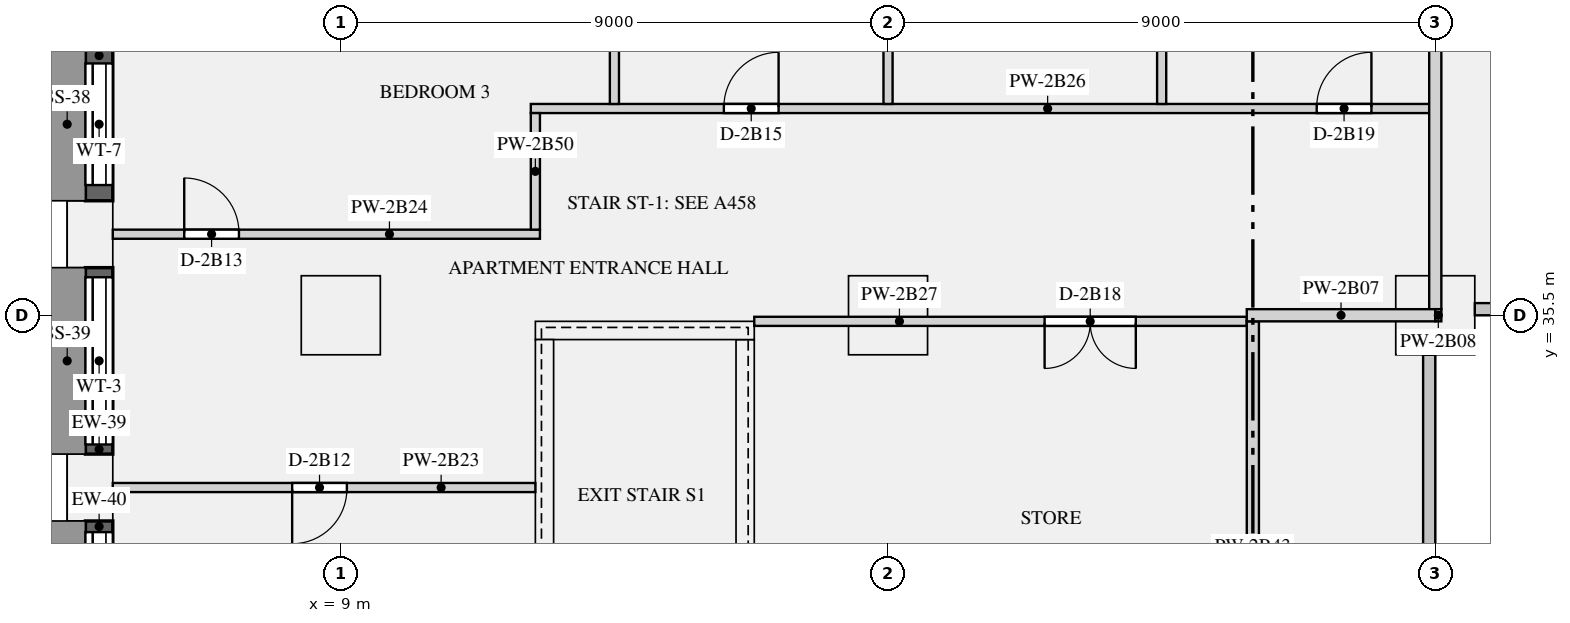
"""IFC4 building model, lengths in metres.
Left out: names, types, materials, properties, quantities, classifications, styles, units other than length and angle.
Written with IfcOpenShell. Run it as: python <this file> out.ifc"""

import sys

from ifc_helpers import new_model, si_unit, direction, frame, frame_2d, origin, origin_2d, place, context, subcontext, project, spatial, rectangle, extrude, element, fill, save


model = new_model("IFC4")
c1 = context("Model", 3, precision=1e-05, world=origin(), true_north=direction((0.0, 1.0)))
c2 = subcontext(c1, "Body", "Model", "MODEL_VIEW")
j1 = project(units=[si_unit("LENGTHUNIT", "METRE"), si_unit("PLANEANGLEUNIT", "RADIAN")], contexts=[c1])
p1 = place(None, origin())
s1 = spatial("IfcSite", under=j1, at=p1, CompositionType="ELEMENT")
p2 = place(p1, origin())
s2 = spatial("IfcBuilding", under=s1, at=p2, CompositionType="ELEMENT")
p3 = place(p2, frame((0.0, 0.0, 93.0)))
s3 = spatial("IfcBuildingStorey", under=s2, at=p3, CompositionType="ELEMENT", Elevation=93.0)
for number, where, z_axis, x_axis in (
    (1, (4.875, 36.833, 0.0), (0.0, 0.0, 1.0), (0.0, -1.0, 0.0)),
    (2, (4.875, 32.667, 0.0), (0.0, 0.0, 1.0), (0.0, -1.0, 0.0)),
):
    element("IfcColumn", number, at=place(p3, frame(where, z_axis=z_axis, x_axis=x_axis)), inside=s3, PredefinedType="USERDEFINED", context=c2, shape_type="SweptSolid", body=[
        extrude(rectangle(XDim=1.1, YDim=0.75, at=origin_2d()), origin(), (0.0, 0.0, 1.0), 3.15),
    ])
for number, where, z_axis, x_axis in (
    (3, (9.0, 35.5, 0.0), (0.0, 0.0, 1.0), (1.0, 0.0, 0.0)),
    (4, (18.0, 35.5, 0.0), (0.0, 0.0, 1.0), (1.0, 0.0, 0.0)),
    (5, (27.0, 35.5, 0.0), (0.0, 0.0, 1.0), (1.0, 0.0, 0.0)),
):
    element("IfcColumn", number, at=place(p3, frame(where, z_axis=z_axis, x_axis=x_axis)), inside=s3, PredefinedType="COLUMN", context=c2, shape_type="SweptSolid", body=[
        extrude(rectangle(XDim=1.3, YDim=1.3, at=origin_2d()), origin(), (0.0, 0.0, 1.0), 3.15),
    ])
p4 = place(p3, frame((12.2, 35.25, 0.0), z_axis=(0.0, 0.0, 1.0), x_axis=(1.0, 0.0, 0.0)))
e6 = element("IfcWall", 6, at=p4, inside=s3, PredefinedType="SHEAR", context=c2, shape_type="SweptSolid", body=[
    extrude(rectangle(XDim=3.6, YDim=0.3, at=frame_2d((1.8, 0.0))), origin(), (0.0, 0.0, 1.0), 3.15),
])
for number, where, z_axis, x_axis in (
    (7, (12.35, 27.3, 0.0), (0.0, 0.0, 1.0), (0.0, 1.0, 0.0)),
    (8, (15.65, 27.3, 0.0), (0.0, 0.0, 1.0), (0.0, 1.0, 0.0)),
):
    element("IfcWall", number, at=place(p3, frame(where, z_axis=z_axis, x_axis=x_axis)), inside=s3, PredefinedType="SHEAR", context=c2, shape_type="SweptSolid", body=[
        extrude(rectangle(XDim=7.8, YDim=0.3, at=frame_2d((3.9, 0.0))), origin(), (0.0, 0.0, 1.0), 3.15),
    ])
p5 = place(p3, frame((5.025, 39.9, 0.9), z_axis=(0.0, 0.0, 1.0), x_axis=(0.0, -1.0, 0.0)))
e9 = element("IfcWall", 9, at=p5, inside=s3, PredefinedType="SOLIDWALL", context=c2, shape_type="SweptSolid", body=[
    extrude(rectangle(XDim=2.517, YDim=0.45, at=frame_2d((1.258, 0.0))), origin(), (0.0, 0.0, 1.0), 1.93),
])
p6 = place(p5, frame((0.259, 0.0, 0.15)))
e10 = element("IfcOpeningElement", 10, at=p6, cuts=e9, PredefinedType="OPENING", context=c2, shape_type="SweptSolid", body=[
    extrude(rectangle(XDim=2.0, YDim=1.5, at=frame_2d((1.0, 0.75))), frame((0.0, 0.235, 0.0), z_axis=(0.0, -1.0, 0.0), x_axis=(1.0, 0.0, 0.0)), (0.0, 0.0, 1.0), 0.47),
])
p7 = place(p3, frame((5.025, 36.283, 0.9), z_axis=(0.0, 0.0, 1.0), x_axis=(0.0, -1.0, 0.0)))
e11 = element("IfcWall", 11, at=p7, inside=s3, PredefinedType="SOLIDWALL", context=c2, shape_type="SweptSolid", body=[
    extrude(rectangle(XDim=3.066, YDim=0.45, at=frame_2d((1.533, 0.0))), origin(), (0.0, 0.0, 1.0), 1.93),
])
p8 = place(p7, frame((0.158, 0.0, 0.15)))
e12 = element("IfcOpeningElement", 12, at=p8, cuts=e11, PredefinedType="OPENING", context=c2, shape_type="SweptSolid", body=[
    extrude(rectangle(XDim=2.75, YDim=1.5, at=frame_2d((1.375, 0.75))), frame((0.0, 0.235, 0.0), z_axis=(0.0, -1.0, 0.0), x_axis=(1.0, 0.0, 0.0)), (0.0, 0.0, 1.0), 0.47),
])
p9 = place(p3, frame((5.025, 32.117, 0.9), z_axis=(0.0, 0.0, 1.0), x_axis=(0.0, -1.0, 0.0)))
e13 = element("IfcWall", 13, at=p9, inside=s3, PredefinedType="SOLIDWALL", context=c2, shape_type="SweptSolid", body=[
    extrude(rectangle(XDim=2.867, YDim=0.45, at=frame_2d((1.434, 0.0))), origin(), (0.0, 0.0, 1.0), 1.93),
])
p10 = place(p9, frame((0.184, 0.0, 0.15)))
e14 = element("IfcOpeningElement", 14, at=p10, cuts=e13, PredefinedType="OPENING", context=c2, shape_type="SweptSolid", body=[
    extrude(rectangle(XDim=2.5, YDim=1.5, at=frame_2d((1.25, 0.75))), frame((0.0, 0.235, 0.0), z_axis=(0.0, -1.0, 0.0), x_axis=(1.0, 0.0, 0.0)), (0.0, 0.0, 1.0), 0.47),
])
p11 = place(p3, frame((23.9, 35.5, 0.0), z_axis=(0.0, 0.0, 1.0), x_axis=(1.0, 0.0, 0.0)))
e15 = element("IfcWall", 15, at=p11, inside=s3, PredefinedType="PARTITIONING", context=c2, shape_type="SweptSolid", body=[
    extrude(rectangle(XDim=3.1, YDim=0.2, at=frame_2d((1.55, 0.0))), origin(), (0.0, 0.0, 1.0), 2.83),
])
p12 = place(p3, frame((27.0, 35.5, 0.0), z_axis=(0.0, 0.0, 1.0), x_axis=(1.0, 0.0, 0.0)))
e16 = element("IfcWall", 16, at=p12, inside=s3, PredefinedType="PARTITIONING", context=c2, shape_type="SweptSolid", body=[
    extrude(rectangle(XDim=0.1, YDim=0.2, at=frame_2d((0.05, 0.0))), origin(), (0.0, 0.0, 1.0), 2.83),
])
p13 = place(p3, frame((5.25, 32.667, 0.0), z_axis=(0.0, 0.0, 1.0), x_axis=(1.0, 0.0, 0.0)))
e17 = element("IfcWall", 17, at=p13, inside=s3, PredefinedType="PARTITIONING", context=c2, shape_type="SweptSolid", body=[
    extrude(rectangle(XDim=6.95, YDim=0.15, at=frame_2d((3.475, 0.0))), origin(), (0.0, 0.0, 1.0), 2.83),
])
p14 = place(p13, frame((2.95, 0.0, 0.0)))
e18 = element("IfcOpeningElement", 18, at=p14, cuts=e17, PredefinedType="OPENING", context=c2, shape_type="SweptSolid", body=[
    extrude(rectangle(XDim=0.9, YDim=2.1, at=frame_2d((0.45, 1.05))), frame((0.0, 0.085, 0.0), z_axis=(0.0, -1.0, 0.0), x_axis=(1.0, 0.0, 0.0)), (0.0, 0.0, 1.0), 0.17),
])
p15 = place(p3, frame((5.25, 36.833, 0.0), z_axis=(0.0, 0.0, 1.0), x_axis=(1.0, 0.0, 0.0)))
e19 = element("IfcWall", 19, at=p15, inside=s3, PredefinedType="PARTITIONING", context=c2, shape_type="SweptSolid", body=[
    extrude(rectangle(XDim=7.025, YDim=0.15, at=frame_2d((3.512, 0.0))), origin(), (0.0, 0.0, 1.0), 2.83),
])
p16 = place(p15, frame((1.175, 0.0, 0.0)))
e20 = element("IfcOpeningElement", 20, at=p16, cuts=e19, PredefinedType="OPENING", context=c2, shape_type="SweptSolid", body=[
    extrude(rectangle(XDim=0.9, YDim=2.1, at=frame_2d((0.45, 1.05))), frame((0.0, 0.085, 0.0), z_axis=(0.0, -1.0, 0.0), x_axis=(1.0, 0.0, 0.0)), (0.0, 0.0, 1.0), 0.17),
])
p17 = place(p3, frame((12.125, 38.9, 0.0), z_axis=(0.0, 0.0, 1.0), x_axis=(1.0, 0.0, 0.0)))
e21 = element("IfcWall", 21, at=p17, inside=s3, PredefinedType="PARTITIONING", context=c2, shape_type="SweptSolid", body=[
    extrude(rectangle(XDim=14.775, YDim=0.15, at=frame_2d((7.387, 0.0))), origin(), (0.0, 0.0, 1.0), 2.83),
])
p18 = place(p17, frame((3.175, 0.0, 0.0)))
e22 = element("IfcOpeningElement", 22, at=p18, cuts=e21, PredefinedType="OPENING", context=c2, shape_type="SweptSolid", body=[
    extrude(rectangle(XDim=0.9, YDim=2.1, at=frame_2d((0.45, 1.05))), frame((0.0, 0.085, 0.0), z_axis=(0.0, -1.0, 0.0), x_axis=(1.0, 0.0, 0.0)), (0.0, 0.0, 1.0), 0.17),
])
p19 = place(p17, frame((12.925, 0.0, 0.0)))
e23 = element("IfcOpeningElement", 23, at=p19, cuts=e21, PredefinedType="OPENING", context=c2, shape_type="SweptSolid", body=[
    extrude(rectangle(XDim=0.9, YDim=2.1, at=frame_2d((0.45, 1.05))), frame((0.0, 0.085, 0.0), z_axis=(0.0, -1.0, 0.0), x_axis=(1.0, 0.0, 0.0)), (0.0, 0.0, 1.0), 0.17),
])
p20 = place(p3, frame((15.8, 35.4, 0.0), z_axis=(0.0, 0.0, 1.0), x_axis=(1.0, 0.0, 0.0)))
e24 = element("IfcWall", 24, at=p20, inside=s3, PredefinedType="PARTITIONING", context=c2, shape_type="SweptSolid", body=[
    extrude(rectangle(XDim=8.1, YDim=0.15, at=frame_2d((4.05, 0.0))), origin(), (0.0, 0.0, 1.0), 2.83),
])
p21 = place(p20, frame((4.775, 0.0, 0.0)))
e25 = element("IfcOpeningElement", 25, at=p21, cuts=e24, PredefinedType="OPENING", context=c2, shape_type="SweptSolid", body=[
    extrude(rectangle(XDim=1.5, YDim=2.1, at=frame_2d((0.75, 1.05))), frame((0.0, 0.085, 0.0), z_axis=(0.0, -1.0, 0.0), x_axis=(1.0, 0.0, 0.0)), (0.0, 0.0, 1.0), 0.17),
])
p22 = place(p3, frame((18.0, 38.975, 0.0), z_axis=(0.0, 0.0, 1.0), x_axis=(0.0, 1.0, 0.0)))
e26 = element("IfcWall", 26, at=p22, inside=s3, PredefinedType="PARTITIONING", context=c2, shape_type="SweptSolid", body=[
    extrude(rectangle(XDim=5.775, YDim=0.15, at=frame_2d((2.887, 0.0))), origin(), (0.0, 0.0, 1.0), 2.83),
])
p23 = place(p22, frame((0.975, 0.0, 0.0)))
e27 = element("IfcOpeningElement", 27, at=p23, cuts=e26, PredefinedType="OPENING", context=c2, shape_type="SweptSolid", body=[
    extrude(rectangle(XDim=0.9, YDim=2.1, at=frame_2d((0.45, 1.05))), frame((0.0, 0.085, 0.0), z_axis=(0.0, -1.0, 0.0), x_axis=(1.0, 0.0, 0.0)), (0.0, 0.0, 1.0), 0.17),
])
p24 = place(p22, frame((3.975, 0.0, 0.0)))
e28 = element("IfcOpeningElement", 28, at=p24, cuts=e26, PredefinedType="OPENING", context=c2, shape_type="SweptSolid", body=[
    extrude(rectangle(XDim=0.9, YDim=2.1, at=frame_2d((0.45, 1.05))), frame((0.0, 0.085, 0.0), z_axis=(0.0, -1.0, 0.0), x_axis=(1.0, 0.0, 0.0)), (0.0, 0.0, 1.0), 0.17),
])
p25 = place(p3, frame((24.0, 27.1, 0.0), z_axis=(0.0, 0.0, 1.0), x_axis=(0.0, 1.0, 0.0)))
e29 = element("IfcWall", 29, at=p25, inside=s3, PredefinedType="PARTITIONING", context=c2, shape_type="SweptSolid", body=[
    extrude(rectangle(XDim=8.3, YDim=0.2, at=frame_2d((4.15, 0.0))), origin(), (0.0, 0.0, 1.0), 2.83),
])
p26 = place(p3, frame((13.5, 38.975, 0.0), z_axis=(0.0, 0.0, 1.0), x_axis=(0.0, 1.0, 0.0)))
e30 = element("IfcWall", 30, at=p26, inside=s3, PredefinedType="PARTITIONING", context=c2, shape_type="SweptSolid", body=[
    extrude(rectangle(XDim=5.775, YDim=0.15, at=frame_2d((2.887, 0.0))), origin(), (0.0, 0.0, 1.0), 2.83),
])
p27 = place(p3, frame((12.2, 36.908, 0.0), z_axis=(0.0, 0.0, 1.0), x_axis=(0.0, 1.0, 0.0)))
e31 = element("IfcWall", 31, at=p27, inside=s3, PredefinedType="PARTITIONING", context=c2, shape_type="SweptSolid", body=[
    extrude(rectangle(XDim=1.917, YDim=0.15, at=frame_2d((0.958, 0.0))), origin(), (0.0, 0.0, 1.0), 2.83),
])
p28 = place(p3, frame((27.0, 35.6, 0.0), z_axis=(0.0, 0.0, 1.0), x_axis=(0.0, 1.0, 0.0)))
e32 = element("IfcWall", 32, at=p28, inside=s3, PredefinedType="PARTITIONING", context=c2, shape_type="SweptSolid", body=[
    extrude(rectangle(XDim=9.15, YDim=0.2, at=frame_2d((4.575, 0.0))), origin(), (0.0, 0.0, 1.0), 2.83),
])
p29 = place(p3, frame((22.5, 38.975, 0.0), z_axis=(0.0, 0.0, 1.0), x_axis=(0.0, 1.0, 0.0)))
e33 = element("IfcWall", 33, at=p29, inside=s3, PredefinedType="PARTITIONING", context=c2, shape_type="SweptSolid", body=[
    extrude(rectangle(XDim=5.775, YDim=0.15, at=frame_2d((2.887, 0.0))), origin(), (0.0, 0.0, 1.0), 2.83),
])
p30 = place(p6, origin())
e34 = element("IfcWindow", 34, at=p30, inside=s3, PartitioningType="SINGLE_PANEL", PredefinedType="WINDOW", context=c2, shape_type="SweptSolid", body=[
    extrude(rectangle(XDim=2.0, YDim=1.5, at=frame_2d((1.0, 0.75))), frame((0.0, -0.065, 0.0), z_axis=(0.0, -1.0, 0.0), x_axis=(1.0, 0.0, 0.0)), (0.0, 0.0, 1.0), 0.06),
])
fill(e10, e34)
p31 = place(p8, origin())
e35 = element("IfcWindow", 35, at=p31, inside=s3, PartitioningType="SINGLE_PANEL", PredefinedType="WINDOW", context=c2, shape_type="SweptSolid", body=[
    extrude(rectangle(XDim=2.75, YDim=1.5, at=frame_2d((1.375, 0.75))), frame((0.0, -0.065, 0.0), z_axis=(0.0, -1.0, 0.0), x_axis=(1.0, 0.0, 0.0)), (0.0, 0.0, 1.0), 0.06),
])
fill(e12, e35)
p32 = place(p10, origin())
e36 = element("IfcWindow", 36, at=p32, inside=s3, PartitioningType="SINGLE_PANEL", PredefinedType="WINDOW", context=c2, shape_type="SweptSolid", body=[
    extrude(rectangle(XDim=2.5, YDim=1.5, at=frame_2d((1.25, 0.75))), frame((0.0, -0.065, 0.0), z_axis=(0.0, -1.0, 0.0), x_axis=(1.0, 0.0, 0.0)), (0.0, 0.0, 1.0), 0.06),
])
fill(e14, e36)
p33 = place(p14, frame((0.9, 0.0, 0.0), z_axis=(0.0, 0.0, 1.0), x_axis=(-1.0, 0.0, 0.0)))
e37 = element("IfcDoor", 37, at=p33, inside=s3, OperationType="SINGLE_SWING_RIGHT", PredefinedType="DOOR", context=c2, shape_type="SweptSolid", body=[
    extrude(rectangle(XDim=0.9, YDim=2.1, at=frame_2d((0.45, 1.05))), frame((0.0, 0.025, 0.0), z_axis=(0.0, -1.0, 0.0), x_axis=(1.0, 0.0, 0.0)), (0.0, 0.0, 1.0), 0.05),
])
fill(e18, e37)
p34 = place(p16, origin())
e38 = element("IfcDoor", 38, at=p34, inside=s3, OperationType="SINGLE_SWING_LEFT", PredefinedType="DOOR", context=c2, shape_type="SweptSolid", body=[
    extrude(rectangle(XDim=0.9, YDim=2.1, at=frame_2d((0.45, 1.05))), frame((0.0, 0.025, 0.0), z_axis=(0.0, -1.0, 0.0), x_axis=(1.0, 0.0, 0.0)), (0.0, 0.0, 1.0), 0.05),
])
fill(e20, e38)
p35 = place(p18, origin())
e39 = element("IfcDoor", 39, at=p35, inside=s3, OperationType="SINGLE_SWING_RIGHT", PredefinedType="DOOR", context=c2, shape_type="SweptSolid", body=[
    extrude(rectangle(XDim=0.9, YDim=2.1, at=frame_2d((0.45, 1.05))), frame((0.0, 0.025, 0.0), z_axis=(0.0, -1.0, 0.0), x_axis=(1.0, 0.0, 0.0)), (0.0, 0.0, 1.0), 0.05),
])
fill(e22, e39)
p36 = place(p21, frame((1.5, 0.0, 0.0), z_axis=(0.0, 0.0, 1.0), x_axis=(-1.0, 0.0, 0.0)))
e40 = element("IfcDoor", 40, at=p36, inside=s3, OperationType="DOUBLE_DOOR_SINGLE_SWING", PredefinedType="DOOR", context=c2, shape_type="SweptSolid", body=[
    extrude(rectangle(XDim=1.5, YDim=2.1, at=frame_2d((0.75, 1.05))), frame((0.0, 0.025, 0.0), z_axis=(0.0, -1.0, 0.0), x_axis=(1.0, 0.0, 0.0)), (0.0, 0.0, 1.0), 0.05),
])
fill(e25, e40)
p37 = place(p19, origin())
e41 = element("IfcDoor", 41, at=p37, inside=s3, OperationType="SINGLE_SWING_RIGHT", PredefinedType="DOOR", context=c2, shape_type="SweptSolid", body=[
    extrude(rectangle(XDim=0.9, YDim=2.1, at=frame_2d((0.45, 1.05))), frame((0.0, 0.025, 0.0), z_axis=(0.0, -1.0, 0.0), x_axis=(1.0, 0.0, 0.0)), (0.0, 0.0, 1.0), 0.05),
])
fill(e23, e41)
save(model, sys.argv[1])
